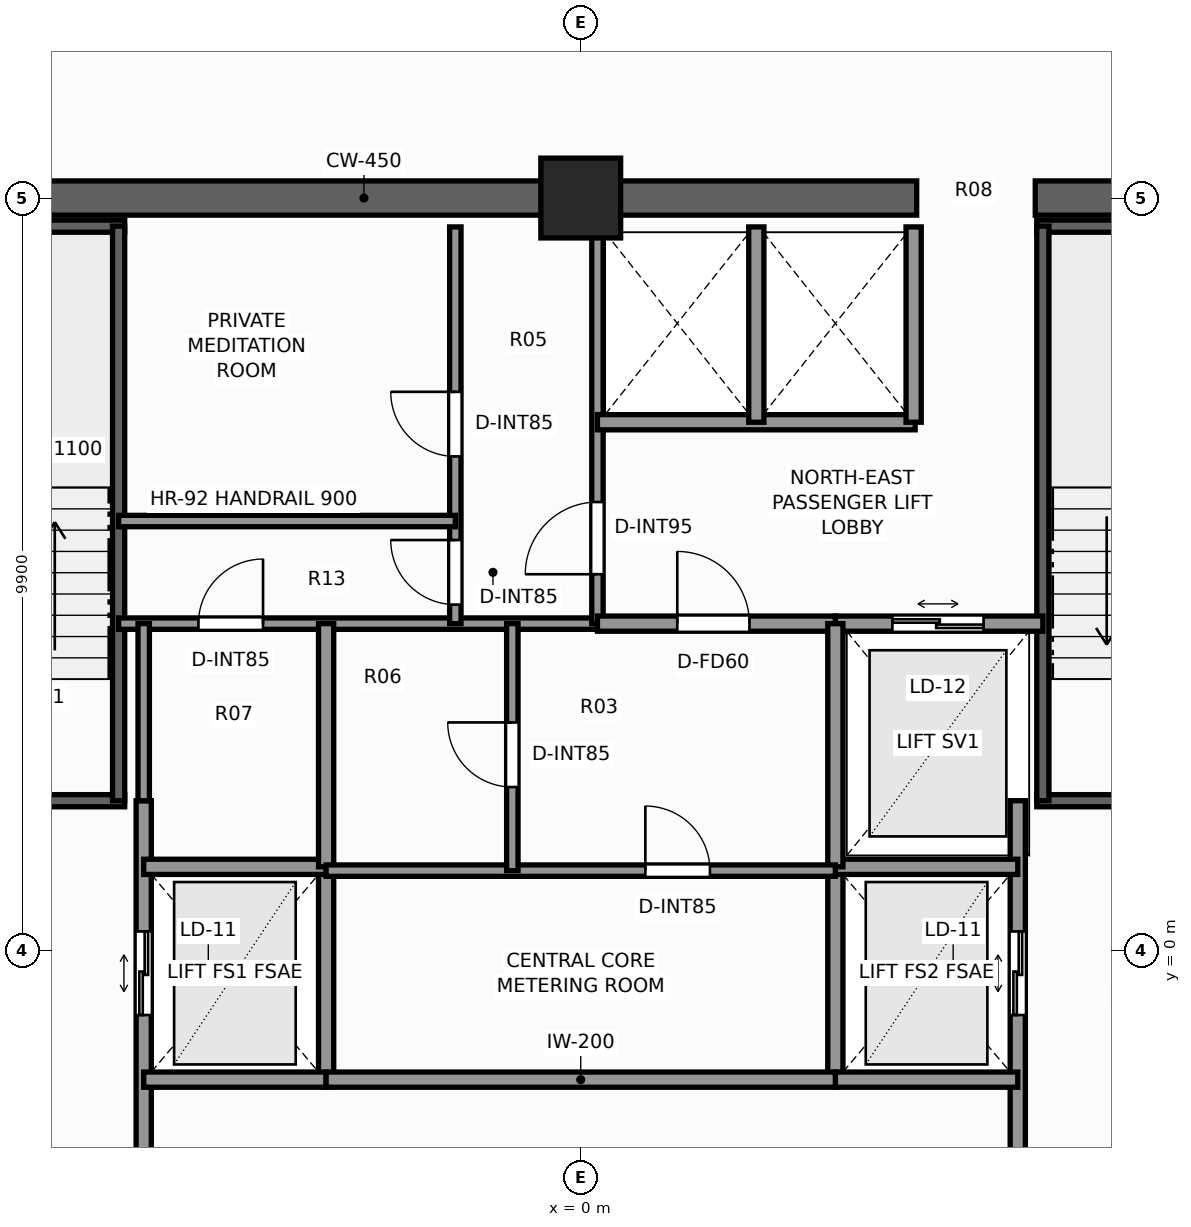
"""IFC4 building model, lengths in metres.
Left out: names, types, materials, properties, quantities, classifications, styles, units other than length and angle.
Written with IfcOpenShell. Run it as: python <this file> out.ifc"""

import sys

from ifc_helpers import new_model, si_unit, direction, frame, frame_2d, origin, origin_2d, place, context, subcontext, project, spatial, rectangle, extrude, element, fill, save


model = new_model("IFC4")
c1 = context("Model", 3, precision=1e-05, world=origin(), true_north=direction((0.0, 1.0)))
c2 = subcontext(c1, "Body", "Model", "MODEL_VIEW")
j1 = project(units=[si_unit("LENGTHUNIT", "METRE"), si_unit("PLANEANGLEUNIT", "RADIAN")], contexts=[c1])
p1 = place(None, origin())
s1 = spatial("IfcSite", under=j1, at=p1, CompositionType="ELEMENT")
p2 = place(p1, origin())
s2 = spatial("IfcBuilding", under=s1, at=p2, CompositionType="ELEMENT")
p3 = place(p2, frame((0.0, 0.0, 254.9)))
s3 = spatial("IfcBuildingStorey", under=s2, at=p3, CompositionType="ELEMENT", Elevation=254.9)
p4 = place(p3, frame((-10.125, 9.9, 0.0), z_axis=(0.0, 0.0, 1.0), x_axis=(1.0, 0.0, 0.0)))
e1 = element("IfcWall", 1, at=p4, inside=s3, PredefinedType="SHEAR", context=c2, shape_type="SweptSolid", body=[
    extrude(rectangle(XDim=14.545, YDim=0.45, at=frame_2d((7.272, 0.0))), origin(), (0.0, 0.0, 1.0), 3.5),
])
p5 = place(p3, frame((5.98, 9.9, 0.0), z_axis=(0.0, 0.0, 1.0), x_axis=(1.0, 0.0, 0.0)))
e2 = element("IfcWall", 2, at=p5, inside=s3, PredefinedType="SHEAR", context=c2, shape_type="SweptSolid", body=[
    extrude(rectangle(XDim=4.145, YDim=0.45, at=frame_2d((2.073, 0.0))), origin(), (0.0, 0.0, 1.0), 3.5),
])
p6 = place(p3, frame((0.0, 9.9, 0.0), z_axis=(0.0, 0.0, 1.0), x_axis=(1.0, 0.0, 0.0)))
e3 = element("IfcColumn", 3, at=p6, inside=s3, PredefinedType="COLUMN", context=c2, shape_type="SweptSolid", body=[
    extrude(rectangle(XDim=1.05, YDim=1.05, at=origin_2d()), origin(), (0.0, 0.0, 1.0), 3.5),
])
p7 = place(p3, frame((-9.52, 1.97, 0.0), z_axis=(0.0, 0.0, 1.0), x_axis=(1.0, 0.0, 0.0)))
e4 = element("IfcWall", 4, at=p7, inside=s3, PredefinedType="SHEAR", context=c2, shape_type="SweptSolid", body=[
    extrude(rectangle(XDim=3.52, YDim=0.16, at=frame_2d((1.76, 0.0))), origin(), (0.0, 0.0, 1.0), 3.5),
])
p8 = place(p7, frame((1.15, 0.0, 0.0)))
e5 = element("IfcOpeningElement", 5, at=p8, cuts=e4, PredefinedType="OPENING", context=c2, shape_type="SweptSolid", body=[
    extrude(rectangle(XDim=1.1, YDim=2.2, at=frame_2d((0.55, 1.1))), frame((0.0, 0.09, 0.0), z_axis=(0.0, -1.0, 0.0), x_axis=(1.0, 0.0, 0.0)), (0.0, 0.0, 1.0), 0.18),
])
p9 = place(p3, frame((-9.52, 9.53, 0.0), z_axis=(0.0, 0.0, 1.0), x_axis=(1.0, 0.0, 0.0)))
e6 = element("IfcWall", 6, at=p9, inside=s3, PredefinedType="SHEAR", context=c2, shape_type="SweptSolid", body=[
    extrude(rectangle(XDim=3.52, YDim=0.16, at=frame_2d((1.76, 0.0))), origin(), (0.0, 0.0, 1.0), 3.5),
])
p10 = place(p3, frame((-6.08, 1.97, 0.0), z_axis=(0.0, 0.0, 1.0), x_axis=(0.0, 1.0, 0.0)))
e7 = element("IfcWall", 7, at=p10, inside=s3, PredefinedType="SHEAR", context=c2, shape_type="SweptSolid", body=[
    extrude(rectangle(XDim=7.56, YDim=0.16, at=frame_2d((3.78, 0.0))), origin(), (0.0, 0.0, 1.0), 3.5),
])
p11 = place(p3, frame((6.0, 1.97, 0.0), z_axis=(0.0, 0.0, 1.0), x_axis=(1.0, 0.0, 0.0)))
e8 = element("IfcWall", 8, at=p11, inside=s3, PredefinedType="SHEAR", context=c2, shape_type="SweptSolid", body=[
    extrude(rectangle(XDim=3.52, YDim=0.16, at=frame_2d((1.76, 0.0))), origin(), (0.0, 0.0, 1.0), 3.5),
])
p12 = place(p11, frame((1.15, 0.0, 0.0)))
e9 = element("IfcOpeningElement", 9, at=p12, cuts=e8, PredefinedType="OPENING", context=c2, shape_type="SweptSolid", body=[
    extrude(rectangle(XDim=1.1, YDim=2.2, at=frame_2d((0.55, 1.1))), frame((0.0, 0.09, 0.0), z_axis=(0.0, -1.0, 0.0), x_axis=(1.0, 0.0, 0.0)), (0.0, 0.0, 1.0), 0.18),
])
p13 = place(p3, frame((6.0, 9.53, 0.0), z_axis=(0.0, 0.0, 1.0), x_axis=(1.0, 0.0, 0.0)))
e10 = element("IfcWall", 10, at=p13, inside=s3, PredefinedType="SHEAR", context=c2, shape_type="SweptSolid", body=[
    extrude(rectangle(XDim=3.52, YDim=0.16, at=frame_2d((1.76, 0.0))), origin(), (0.0, 0.0, 1.0), 3.5),
])
p14 = place(p3, frame((6.08, 1.97, 0.0), z_axis=(0.0, 0.0, 1.0), x_axis=(0.0, 1.0, 0.0)))
e11 = element("IfcWall", 11, at=p14, inside=s3, PredefinedType="SHEAR", context=c2, shape_type="SweptSolid", body=[
    extrude(rectangle(XDim=7.56, YDim=0.16, at=frame_2d((3.78, 0.0))), origin(), (0.0, 0.0, 1.0), 3.5),
])
p15 = place(p3, frame((-5.75, -3.6, 0.0), z_axis=(0.0, 0.0, 1.0), x_axis=(0.0, 1.0, 0.0)))
e12 = element("IfcWall", 12, at=p15, inside=s3, PredefinedType="SOLIDWALL", context=c2, shape_type="SweptSolid", body=[
    extrude(rectangle(XDim=5.57, YDim=0.2, at=frame_2d((2.785, 0.0))), origin(), (0.0, 0.0, 1.0), 3.22),
])
p16 = place(p15, frame((2.75, 0.0, 0.0)))
e13 = element("IfcOpeningElement", 13, at=p16, cuts=e12, PredefinedType="OPENING", context=c2, shape_type="SweptSolid", body=[
    extrude(rectangle(XDim=1.1, YDim=2.2, at=frame_2d((0.55, 1.1))), frame((0.0, 0.11, 0.0), z_axis=(0.0, -1.0, 0.0), x_axis=(1.0, 0.0, 0.0)), (0.0, 0.0, 1.0), 0.22),
])
p17 = place(p3, frame((-3.35, -1.7, 0.0), z_axis=(0.0, 0.0, 1.0), x_axis=(0.0, 1.0, 0.0)))
e14 = element("IfcWall", 14, at=p17, inside=s3, PredefinedType="SOLIDWALL", context=c2, shape_type="SweptSolid", body=[
    extrude(rectangle(XDim=2.8, YDim=0.2, at=frame_2d((1.4, 0.0))), origin(), (0.0, 0.0, 1.0), 3.22),
])
for number, where, z_axis, x_axis in (
    (15, (-5.75, -1.7, 0.0), (0.0, 0.0, 1.0), (1.0, 0.0, 0.0)),
    (16, (-5.75, 1.1, 0.0), (0.0, 0.0, 1.0), (1.0, 0.0, 0.0)),
):
    element("IfcWall", number, at=place(p3, frame(where, z_axis=z_axis, x_axis=x_axis)), inside=s3, PredefinedType="SOLIDWALL", context=c2, shape_type="SweptSolid", body=[
        extrude(rectangle(XDim=2.4, YDim=0.2, at=frame_2d((1.2, 0.0))), origin(), (0.0, 0.0, 1.0), 3.22),
    ])
p18 = place(p3, frame((5.75, -3.6, 0.0), z_axis=(0.0, 0.0, 1.0), x_axis=(0.0, 1.0, 0.0)))
e17 = element("IfcWall", 17, at=p18, inside=s3, PredefinedType="SOLIDWALL", context=c2, shape_type="SweptSolid", body=[
    extrude(rectangle(XDim=5.57, YDim=0.2, at=frame_2d((2.785, 0.0))), origin(), (0.0, 0.0, 1.0), 3.22),
])
p19 = place(p18, frame((2.75, 0.0, 0.0)))
e18 = element("IfcOpeningElement", 18, at=p19, cuts=e17, PredefinedType="OPENING", context=c2, shape_type="SweptSolid", body=[
    extrude(rectangle(XDim=1.1, YDim=2.2, at=frame_2d((0.55, 1.1))), frame((0.0, 0.11, 0.0), z_axis=(0.0, -1.0, 0.0), x_axis=(1.0, 0.0, 0.0)), (0.0, 0.0, 1.0), 0.22),
])
p20 = place(p3, frame((3.35, -1.7, 0.0), z_axis=(0.0, 0.0, 1.0), x_axis=(0.0, 1.0, 0.0)))
e19 = element("IfcWall", 19, at=p20, inside=s3, PredefinedType="SOLIDWALL", context=c2, shape_type="SweptSolid", body=[
    extrude(rectangle(XDim=2.8, YDim=0.2, at=frame_2d((1.4, 0.0))), origin(), (0.0, 0.0, 1.0), 3.22),
])
for number, where, z_axis, x_axis in (
    (20, (3.35, -1.7, 0.0), (0.0, 0.0, 1.0), (1.0, 0.0, 0.0)),
    (21, (3.35, 1.1, 0.0), (0.0, 0.0, 1.0), (1.0, 0.0, 0.0)),
):
    element("IfcWall", number, at=place(p3, frame(where, z_axis=z_axis, x_axis=x_axis)), inside=s3, PredefinedType="SOLIDWALL", context=c2, shape_type="SweptSolid", body=[
        extrude(rectangle(XDim=2.4, YDim=0.2, at=frame_2d((1.2, 0.0))), origin(), (0.0, 0.0, 1.0), 3.22),
    ])
p21 = place(p3, frame((3.35, 4.3, 0.0), z_axis=(0.0, 0.0, 1.0), x_axis=(1.0, 0.0, 0.0)))
e22 = element("IfcWall", 22, at=p21, inside=s3, PredefinedType="SOLIDWALL", context=c2, shape_type="SweptSolid", body=[
    extrude(rectangle(XDim=2.73, YDim=0.2, at=frame_2d((1.365, 0.0))), origin(), (0.0, 0.0, 1.0), 3.22),
])
p22 = place(p21, frame((0.75, 0.0, 0.0)))
e23 = element("IfcOpeningElement", 23, at=p22, cuts=e22, PredefinedType="OPENING", context=c2, shape_type="SweptSolid", body=[
    extrude(rectangle(XDim=1.2, YDim=2.25, at=frame_2d((0.6, 1.125))), frame((0.0, 0.11, 0.0), z_axis=(0.0, -1.0, 0.0), x_axis=(1.0, 0.0, 0.0)), (0.0, 0.0, 1.0), 0.22),
])
p23 = place(p3, frame((-6.08, 4.3, 0.0), z_axis=(0.0, 0.0, 1.0), x_axis=(1.0, 0.0, 0.0)))
e24 = element("IfcWall", 24, at=p23, inside=s3, PredefinedType="PARTITIONING", context=c2, shape_type="SweptSolid", body=[
    extrude(rectangle(XDim=6.3, YDim=0.15, at=frame_2d((3.15, 0.0))), origin(), (0.0, 0.0, 1.0), 3.22),
])
p24 = place(p23, frame((1.05, 0.0, 0.0)))
e25 = element("IfcOpeningElement", 25, at=p24, cuts=e24, PredefinedType="OPENING", context=c2, shape_type="SweptSolid", body=[
    extrude(rectangle(XDim=0.85, YDim=2.03, at=frame_2d((0.425, 1.015))), frame((0.0, 0.085, 0.0), z_axis=(0.0, -1.0, 0.0), x_axis=(1.0, 0.0, 0.0)), (0.0, 0.0, 1.0), 0.17),
])
p25 = place(p3, frame((0.22, 4.3, 0.0), z_axis=(0.0, 0.0, 1.0), x_axis=(0.0, 1.0, 0.0)))
e26 = element("IfcWall", 26, at=p25, inside=s3, PredefinedType="PARTITIONING", context=c2, shape_type="SweptSolid", body=[
    extrude(rectangle(XDim=5.22, YDim=0.15, at=frame_2d((2.61, 0.0))), origin(), (0.0, 0.0, 1.0), 3.22),
])
p26 = place(p25, frame((0.65, 0.0, 0.0)))
e27 = element("IfcOpeningElement", 27, at=p26, cuts=e26, PredefinedType="OPENING", context=c2, shape_type="SweptSolid", body=[
    extrude(rectangle(XDim=0.95, YDim=2.06, at=frame_2d((0.475, 1.03))), frame((0.0, 0.085, 0.0), z_axis=(0.0, -1.0, 0.0), x_axis=(1.0, 0.0, 0.0)), (0.0, 0.0, 1.0), 0.17),
])
p27 = place(p3, frame((-1.65, 4.3, 0.0), z_axis=(0.0, 0.0, 1.0), x_axis=(0.0, 1.0, 0.0)))
e28 = element("IfcWall", 28, at=p27, inside=s3, PredefinedType="PARTITIONING", context=c2, shape_type="SweptSolid", body=[
    extrude(rectangle(XDim=5.22, YDim=0.15, at=frame_2d((2.61, 0.0))), origin(), (0.0, 0.0, 1.0), 3.22),
])
p28 = place(p27, frame((2.2, 0.0, 0.0)))
e29 = element("IfcOpeningElement", 29, at=p28, cuts=e28, PredefinedType="OPENING", context=c2, shape_type="SweptSolid", body=[
    extrude(rectangle(XDim=0.85, YDim=2.03, at=frame_2d((0.425, 1.015))), frame((0.0, 0.085, 0.0), z_axis=(0.0, -1.0, 0.0), x_axis=(1.0, 0.0, 0.0)), (0.0, 0.0, 1.0), 0.17),
])
p29 = place(p27, frame((0.25, 0.0, 0.0)))
e30 = element("IfcOpeningElement", 30, at=p29, cuts=e28, PredefinedType="OPENING", context=c2, shape_type="SweptSolid", body=[
    extrude(rectangle(XDim=0.85, YDim=2.03, at=frame_2d((0.425, 1.015))), frame((0.0, 0.085, 0.0), z_axis=(0.0, -1.0, 0.0), x_axis=(1.0, 0.0, 0.0)), (0.0, 0.0, 1.0), 0.17),
])
p30 = place(p3, frame((-6.08, 5.65, 0.0), z_axis=(0.0, 0.0, 1.0), x_axis=(1.0, 0.0, 0.0)))
e31 = element("IfcWall", 31, at=p30, inside=s3, PredefinedType="PARTITIONING", context=c2, shape_type="SweptSolid", body=[
    extrude(rectangle(XDim=4.43, YDim=0.15, at=frame_2d((2.215, 0.0))), origin(), (0.0, 0.0, 1.0), 3.22),
])
p31 = place(p3, frame((0.22, 6.95, 0.0), z_axis=(0.0, 0.0, 1.0), x_axis=(1.0, 0.0, 0.0)))
e32 = element("IfcWall", 32, at=p31, inside=s3, PredefinedType="SOLIDWALL", context=c2, shape_type="SweptSolid", body=[
    extrude(rectangle(XDim=4.18, YDim=0.2, at=frame_2d((2.09, 0.0))), origin(), (0.0, 0.0, 1.0), 3.22),
])
for number, where, z_axis, x_axis in (
    (33, (4.38, 6.95, 0.0), (0.0, 0.0, 1.0), (0.0, 1.0, 0.0)),
    (34, (2.31, 6.95, 0.0), (0.0, 0.0, 1.0), (0.0, 1.0, 0.0)),
):
    element("IfcWall", number, at=place(p3, frame(where, z_axis=z_axis, x_axis=x_axis)), inside=s3, PredefinedType="SOLIDWALL", context=c2, shape_type="SweptSolid", body=[
        extrude(rectangle(XDim=2.57, YDim=0.2, at=frame_2d((1.285, 0.0))), origin(), (0.0, 0.0, 1.0), 3.22),
    ])
p32 = place(p3, frame((0.22, 4.3, 0.0), z_axis=(0.0, 0.0, 1.0), x_axis=(1.0, 0.0, 0.0)))
e35 = element("IfcWall", 35, at=p32, inside=s3, PredefinedType="SOLIDWALL", context=c2, shape_type="SweptSolid", body=[
    extrude(rectangle(XDim=3.13, YDim=0.2, at=frame_2d((1.565, 0.0))), origin(), (0.0, 0.0, 1.0), 3.22),
])
p33 = place(p32, frame((1.05, 0.0, 0.0)))
e36 = element("IfcOpeningElement", 36, at=p33, cuts=e35, PredefinedType="OPENING", context=c2, shape_type="SweptSolid", body=[
    extrude(rectangle(XDim=0.95, YDim=2.06, at=frame_2d((0.475, 1.03))), frame((0.0, 0.11, 0.0), z_axis=(0.0, -1.0, 0.0), x_axis=(1.0, 0.0, 0.0)), (0.0, 0.0, 1.0), 0.22),
])
p34 = place(p3, frame((-3.35, -1.7, 0.0), z_axis=(0.0, 0.0, 1.0), x_axis=(1.0, 0.0, 0.0)))
e37 = element("IfcWall", 37, at=p34, inside=s3, PredefinedType="SOLIDWALL", context=c2, shape_type="SweptSolid", body=[
    extrude(rectangle(XDim=6.7, YDim=0.2, at=frame_2d((3.35, 0.0))), origin(), (0.0, 0.0, 1.0), 3.22),
])
for number, where, z_axis, x_axis in (
    (38, (-3.35, 1.1, 0.0), (0.0, 0.0, 1.0), (0.0, 1.0, 0.0)),
    (39, (3.35, 1.1, 0.0), (0.0, 0.0, 1.0), (0.0, 1.0, 0.0)),
):
    element("IfcWall", number, at=place(p3, frame(where, z_axis=z_axis, x_axis=x_axis)), inside=s3, PredefinedType="SOLIDWALL", context=c2, shape_type="SweptSolid", body=[
        extrude(rectangle(XDim=3.2, YDim=0.2, at=frame_2d((1.6, 0.0))), origin(), (0.0, 0.0, 1.0), 3.22),
    ])
p35 = place(p3, frame((-3.35, 1.05, 0.0), z_axis=(0.0, 0.0, 1.0), x_axis=(1.0, 0.0, 0.0)))
e40 = element("IfcWall", 40, at=p35, inside=s3, PredefinedType="PARTITIONING", context=c2, shape_type="SweptSolid", body=[
    extrude(rectangle(XDim=6.7, YDim=0.15, at=frame_2d((3.35, 0.0))), origin(), (0.0, 0.0, 1.0), 3.22),
])
p36 = place(p35, frame((4.2, 0.0, 0.0)))
e41 = element("IfcOpeningElement", 41, at=p36, cuts=e40, PredefinedType="OPENING", context=c2, shape_type="SweptSolid", body=[
    extrude(rectangle(XDim=0.85, YDim=2.03, at=frame_2d((0.425, 1.015))), frame((0.0, 0.085, 0.0), z_axis=(0.0, -1.0, 0.0), x_axis=(1.0, 0.0, 0.0)), (0.0, 0.0, 1.0), 0.17),
])
p37 = place(p3, frame((-0.9, 1.05, 0.0), z_axis=(0.0, 0.0, 1.0), x_axis=(0.0, 1.0, 0.0)))
e42 = element("IfcWall", 42, at=p37, inside=s3, PredefinedType="PARTITIONING", context=c2, shape_type="SweptSolid", body=[
    extrude(rectangle(XDim=3.25, YDim=0.15, at=frame_2d((1.625, 0.0))), origin(), (0.0, 0.0, 1.0), 3.22),
])
p38 = place(p37, frame((1.1, 0.0, 0.0)))
e43 = element("IfcOpeningElement", 43, at=p38, cuts=e42, PredefinedType="OPENING", context=c2, shape_type="SweptSolid", body=[
    extrude(rectangle(XDim=0.85, YDim=2.03, at=frame_2d((0.425, 1.015))), frame((0.0, 0.085, 0.0), z_axis=(0.0, -1.0, 0.0), x_axis=(1.0, 0.0, 0.0)), (0.0, 0.0, 1.0), 0.17),
])
p39 = place(p3, frame((-5.75, 1.97, 0.0), z_axis=(0.0, 0.0, 1.0), x_axis=(0.0, 1.0, 0.0)))
e44 = element("IfcWall", 44, at=p39, inside=s3, PredefinedType="PARTITIONING", context=c2, shape_type="SweptSolid", body=[
    extrude(rectangle(XDim=2.33, YDim=0.15, at=frame_2d((1.165, 0.0))), origin(), (0.0, 0.0, 1.0), 3.22),
])
p40 = place(p16, origin())
e45 = element("IfcDoor", 45, at=p40, inside=s3, OperationType="DOUBLE_DOOR_SLIDING", PredefinedType="DOOR", context=c2, shape_type="SweptSolid", body=[
    extrude(rectangle(XDim=1.1, YDim=2.2, at=frame_2d((0.55, 1.1))), frame((0.0, 0.025, 0.0), z_axis=(0.0, -1.0, 0.0), x_axis=(1.0, 0.0, 0.0)), (0.0, 0.0, 1.0), 0.05),
])
fill(e13, e45)
p41 = place(p19, origin())
e46 = element("IfcDoor", 46, at=p41, inside=s3, OperationType="DOUBLE_DOOR_SLIDING", PredefinedType="DOOR", context=c2, shape_type="SweptSolid", body=[
    extrude(rectangle(XDim=1.1, YDim=2.2, at=frame_2d((0.55, 1.1))), frame((0.0, 0.025, 0.0), z_axis=(0.0, -1.0, 0.0), x_axis=(1.0, 0.0, 0.0)), (0.0, 0.0, 1.0), 0.05),
])
fill(e18, e46)
p42 = place(p22, origin())
e47 = element("IfcDoor", 47, at=p42, inside=s3, OperationType="DOUBLE_DOOR_SLIDING", PredefinedType="DOOR", context=c2, shape_type="SweptSolid", body=[
    extrude(rectangle(XDim=1.2, YDim=2.25, at=frame_2d((0.6, 1.125))), frame((0.0, 0.025, 0.0), z_axis=(0.0, -1.0, 0.0), x_axis=(1.0, 0.0, 0.0)), (0.0, 0.0, 1.0), 0.05),
])
fill(e23, e47)
p43 = place(p26, origin())
e48 = element("IfcDoor", 48, at=p43, inside=s3, OperationType="SINGLE_SWING_LEFT", PredefinedType="DOOR", context=c2, shape_type="SweptSolid", body=[
    extrude(rectangle(XDim=0.95, YDim=2.06, at=frame_2d((0.475, 1.03))), frame((0.0, 0.025, 0.0), z_axis=(0.0, -1.0, 0.0), x_axis=(1.0, 0.0, 0.0)), (0.0, 0.0, 1.0), 0.05),
])
fill(e27, e48)
p44 = place(p28, origin())
e49 = element("IfcDoor", 49, at=p44, inside=s3, OperationType="SINGLE_SWING_RIGHT", PredefinedType="DOOR", context=c2, shape_type="SweptSolid", body=[
    extrude(rectangle(XDim=0.85, YDim=2.03, at=frame_2d((0.425, 1.015))), frame((0.0, 0.025, 0.0), z_axis=(0.0, -1.0, 0.0), x_axis=(1.0, 0.0, 0.0)), (0.0, 0.0, 1.0), 0.05),
])
fill(e29, e49)
p45 = place(p29, origin())
e50 = element("IfcDoor", 50, at=p45, inside=s3, OperationType="SINGLE_SWING_RIGHT", PredefinedType="DOOR", context=c2, shape_type="SweptSolid", body=[
    extrude(rectangle(XDim=0.85, YDim=2.03, at=frame_2d((0.425, 1.015))), frame((0.0, 0.025, 0.0), z_axis=(0.0, -1.0, 0.0), x_axis=(1.0, 0.0, 0.0)), (0.0, 0.0, 1.0), 0.05),
])
fill(e30, e50)
p46 = place(p33, origin())
e51 = element("IfcDoor", 51, at=p46, inside=s3, OperationType="SINGLE_SWING_LEFT", PredefinedType="DOOR", context=c2, shape_type="SweptSolid", body=[
    extrude(rectangle(XDim=0.95, YDim=2.06, at=frame_2d((0.475, 1.03))), frame((0.0, 0.025, 0.0), z_axis=(0.0, -1.0, 0.0), x_axis=(1.0, 0.0, 0.0)), (0.0, 0.0, 1.0), 0.05),
])
fill(e36, e51)
p47 = place(p36, origin())
e52 = element("IfcDoor", 52, at=p47, inside=s3, OperationType="SINGLE_SWING_LEFT", PredefinedType="DOOR", context=c2, shape_type="SweptSolid", body=[
    extrude(rectangle(XDim=0.85, YDim=2.03, at=frame_2d((0.425, 1.015))), frame((0.0, 0.025, 0.0), z_axis=(0.0, -1.0, 0.0), x_axis=(1.0, 0.0, 0.0)), (0.0, 0.0, 1.0), 0.05),
])
fill(e41, e52)
p48 = place(p38, origin())
e53 = element("IfcDoor", 53, at=p48, inside=s3, OperationType="SINGLE_SWING_RIGHT", PredefinedType="DOOR", context=c2, shape_type="SweptSolid", body=[
    extrude(rectangle(XDim=0.85, YDim=2.03, at=frame_2d((0.425, 1.015))), frame((0.0, 0.025, 0.0), z_axis=(0.0, -1.0, 0.0), x_axis=(1.0, 0.0, 0.0)), (0.0, 0.0, 1.0), 0.05),
])
fill(e43, e53)
p49 = place(p24, origin())
e54 = element("IfcDoor", 54, at=p49, inside=s3, OperationType="SINGLE_SWING_RIGHT", PredefinedType="DOOR", context=c2, shape_type="SweptSolid", body=[
    extrude(rectangle(XDim=0.85, YDim=2.03, at=frame_2d((0.425, 1.015))), frame((0.0, 0.025, 0.0), z_axis=(0.0, -1.0, 0.0), x_axis=(1.0, 0.0, 0.0)), (0.0, 0.0, 1.0), 0.05),
])
fill(e25, e54)
save(model, sys.argv[1])
